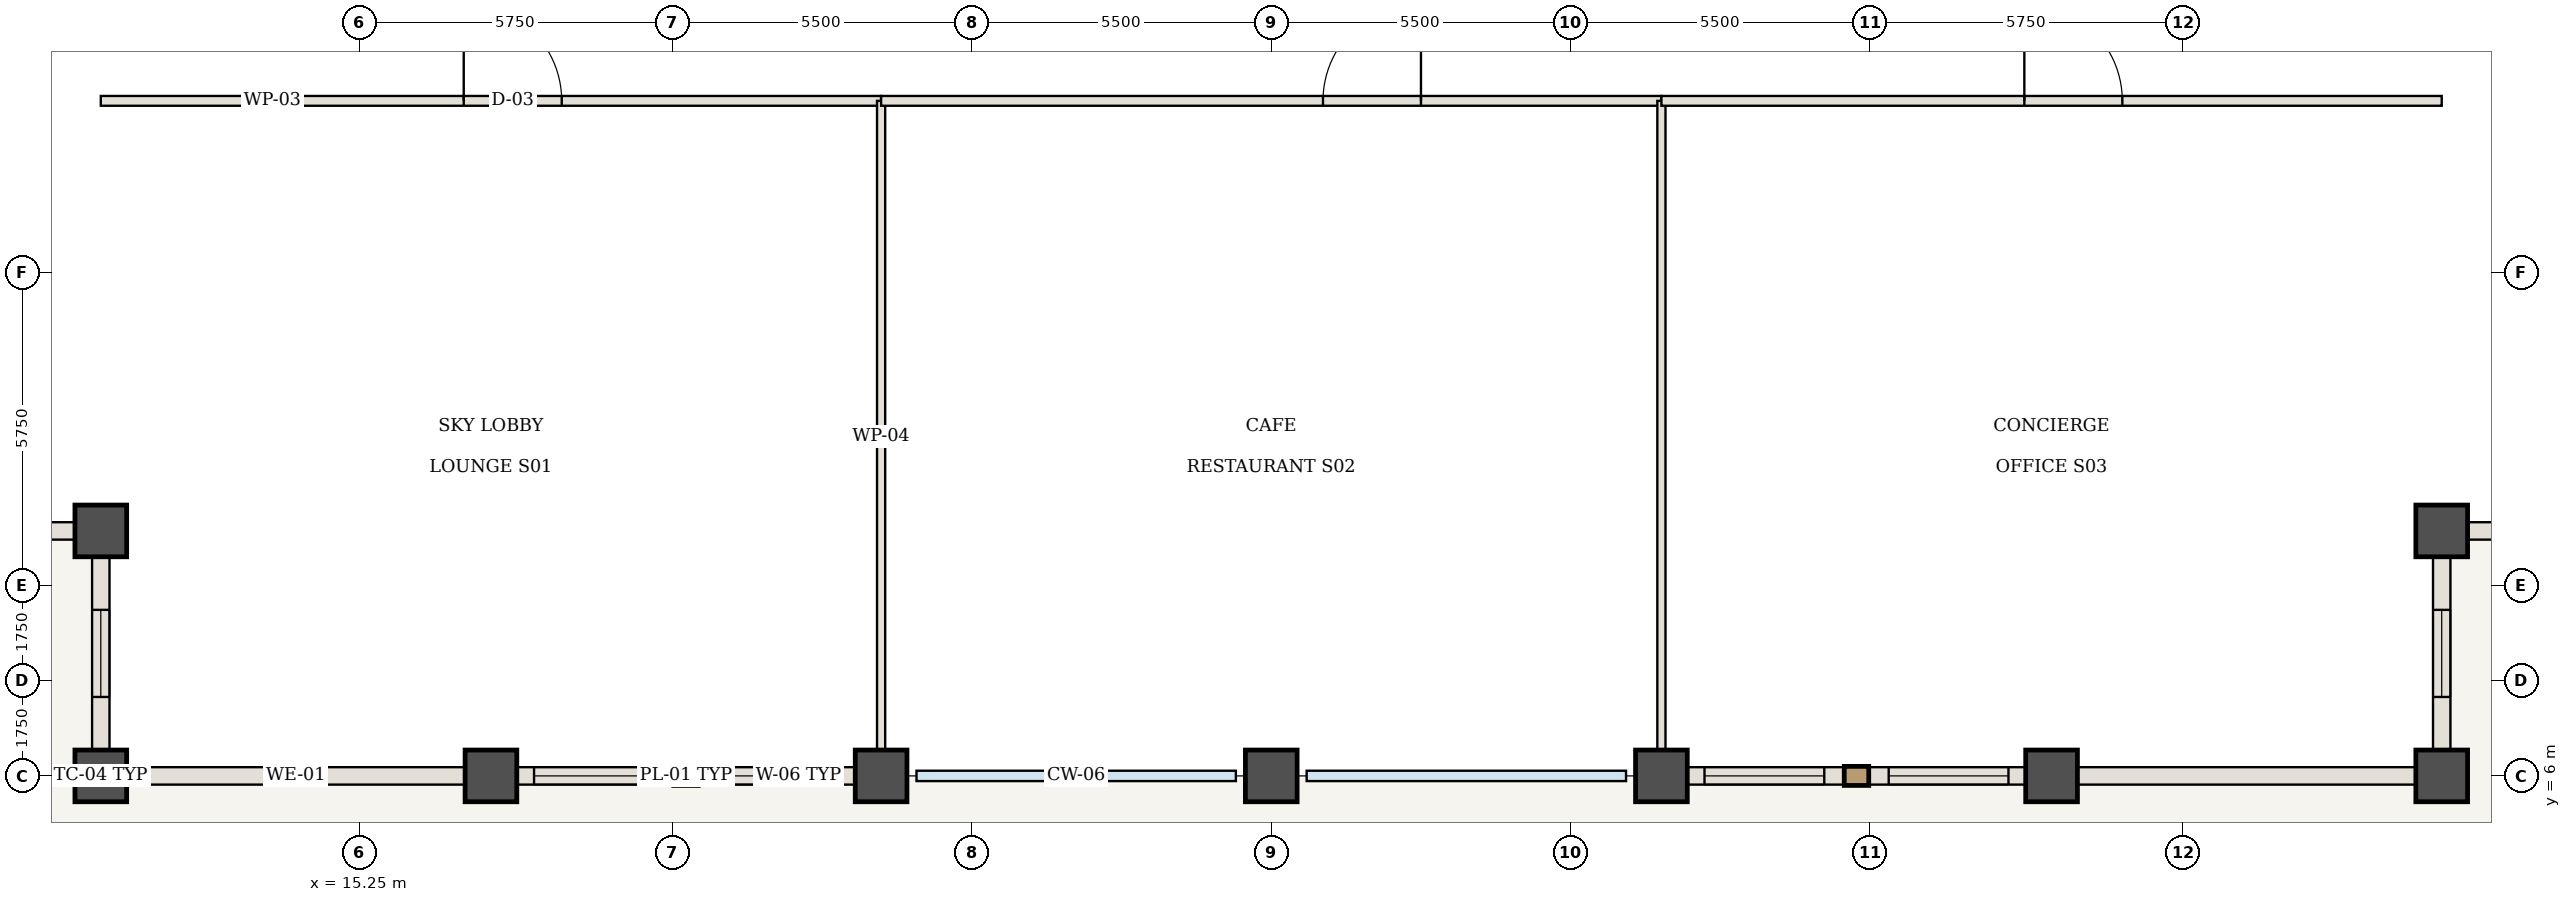
"""IFC4 building model, lengths in metres.
Left out: names, types, materials, properties, quantities, classifications, styles, units other than length and angle.
Written with IfcOpenShell. Run it as: python <this file> out.ifc"""

import sys

from ifc_helpers import new_model, si_unit, direction, frame, frame_2d, origin, origin_2d, place, context, subcontext, project, spatial, rectangle, extrude, element, fill, save


model = new_model("IFC4")
c1 = context("Model", 3, precision=1e-05, world=origin(), true_north=direction((0.0, 1.0)))
c2 = subcontext(c1, "Body", "Model", "MODEL_VIEW")
j1 = project(units=[si_unit("LENGTHUNIT", "METRE"), si_unit("PLANEANGLEUNIT", "RADIAN")], contexts=[c1])
p1 = place(None, origin())
s1 = spatial("IfcSite", under=j1, at=p1, CompositionType="ELEMENT")
p2 = place(p1, origin())
s2 = spatial("IfcBuilding", under=s1, at=p2, CompositionType="ELEMENT")
p3 = place(p2, frame((0.0, 0.0, 106.05)))
s3 = spatial("IfcBuildingStorey", under=s2, at=p3, CompositionType="ELEMENT", Elevation=106.05)
for number, where, z_axis, x_axis in (
    (1, (10.5, 6.0, -0.42), (0.0, 0.0, 1.0), (1.0, 0.0, 0.0)),
    (2, (10.5, 10.5, -0.42), (0.0, 0.0, 1.0), (1.0, 0.0, 0.0)),
    (3, (53.5, 6.0, -0.42), (0.0, 0.0, 1.0), (1.0, 0.0, 0.0)),
    (4, (53.5, 10.5, -0.42), (0.0, 0.0, 1.0), (1.0, 0.0, 0.0)),
    (5, (17.667, 6.0, -0.42), (0.0, 0.0, 1.0), (1.0, 0.0, 0.0)),
    (6, (24.833, 6.0, -0.42), (0.0, 0.0, 1.0), (1.0, 0.0, 0.0)),
    (7, (32.0, 6.0, -0.42), (0.0, 0.0, 1.0), (1.0, 0.0, 0.0)),
    (8, (39.167, 6.0, -0.42), (0.0, 0.0, 1.0), (1.0, 0.0, 0.0)),
    (9, (46.333, 6.0, -0.42), (0.0, 0.0, 1.0), (1.0, 0.0, 0.0)),
):
    element("IfcColumn", number, at=place(p3, frame(where, z_axis=z_axis, x_axis=x_axis)), inside=s3, PredefinedType="COLUMN", context=c2, shape_type="SweptSolid", body=[
        extrude(rectangle(XDim=0.95, YDim=0.95, at=origin_2d()), origin(), (0.0, 0.0, 1.0), 4.97),
    ])
p4 = place(p3, frame((10.5, 18.4, 0.0), z_axis=(0.0, 0.0, 1.0), x_axis=(1.0, 0.0, 0.0)))
e10 = element("IfcWall", 10, at=p4, inside=s3, PredefinedType="STANDARD", context=c2, shape_type="SweptSolid", body=[
    extrude(rectangle(XDim=14.333, YDim=0.18, at=frame_2d((7.167, 0.0))), origin(), (0.0, 0.0, 1.0), 4.13),
])
p5 = place(p4, frame((6.667, 0.0, 0.0)))
e11 = element("IfcOpeningElement", 11, at=p5, cuts=e10, PredefinedType="OPENING", context=c2, shape_type="SweptSolid", body=[
    extrude(rectangle(XDim=1.8, YDim=2.35, at=frame_2d((0.9, 1.175))), frame((0.0, 0.1, 0.0), z_axis=(0.0, -1.0, 0.0), x_axis=(1.0, 0.0, 0.0)), (0.0, 0.0, 1.0), 0.2),
])
p6 = place(p3, frame((24.833, 6.06, 0.0), z_axis=(0.0, 0.0, 1.0), x_axis=(0.0, 1.0, 0.0)))
e12 = element("IfcWall", 12, at=p6, inside=s3, PredefinedType="STANDARD", context=c2, shape_type="SweptSolid", body=[
    extrude(rectangle(XDim=12.34, YDim=0.15, at=frame_2d((6.17, 0.0))), origin(), (0.0, 0.0, 1.0), 4.13),
])
p7 = place(p3, frame((24.833, 18.4, 0.0), z_axis=(0.0, 0.0, 1.0), x_axis=(1.0, 0.0, 0.0)))
e13 = element("IfcWall", 13, at=p7, inside=s3, PredefinedType="STANDARD", context=c2, shape_type="SweptSolid", body=[
    extrude(rectangle(XDim=14.333, YDim=0.18, at=frame_2d((7.167, 0.0))), origin(), (0.0, 0.0, 1.0), 4.13),
])
p8 = place(p7, frame((8.117, 0.0, 0.0)))
e14 = element("IfcOpeningElement", 14, at=p8, cuts=e13, PredefinedType="OPENING", context=c2, shape_type="SweptSolid", body=[
    extrude(rectangle(XDim=1.8, YDim=2.35, at=frame_2d((0.9, 1.175))), frame((0.0, 0.1, 0.0), z_axis=(0.0, -1.0, 0.0), x_axis=(1.0, 0.0, 0.0)), (0.0, 0.0, 1.0), 0.2),
])
p9 = place(p3, frame((39.167, 6.06, 0.0), z_axis=(0.0, 0.0, 1.0), x_axis=(0.0, 1.0, 0.0)))
e15 = element("IfcWall", 15, at=p9, inside=s3, PredefinedType="STANDARD", context=c2, shape_type="SweptSolid", body=[
    extrude(rectangle(XDim=12.34, YDim=0.15, at=frame_2d((6.17, 0.0))), origin(), (0.0, 0.0, 1.0), 4.13),
])
p10 = place(p3, frame((39.167, 18.4, 0.0), z_axis=(0.0, 0.0, 1.0), x_axis=(1.0, 0.0, 0.0)))
e16 = element("IfcWall", 16, at=p10, inside=s3, PredefinedType="STANDARD", context=c2, shape_type="SweptSolid", body=[
    extrude(rectangle(XDim=14.333, YDim=0.18, at=frame_2d((7.167, 0.0))), origin(), (0.0, 0.0, 1.0), 4.13),
])
p11 = place(p10, frame((6.667, 0.0, 0.0)))
e17 = element("IfcOpeningElement", 17, at=p11, cuts=e16, PredefinedType="OPENING", context=c2, shape_type="SweptSolid", body=[
    extrude(rectangle(XDim=1.8, YDim=2.35, at=frame_2d((0.9, 1.175))), frame((0.0, 0.1, 0.0), z_axis=(0.0, -1.0, 0.0), x_axis=(1.0, 0.0, 0.0)), (0.0, 0.0, 1.0), 0.2),
])
p12 = place(p3, frame((17.667, 6.0, 0.0), z_axis=(0.0, 0.0, 1.0), x_axis=(-1.0, 0.0, 0.0)))
e18 = element("IfcWall", 18, at=p12, inside=s3, PredefinedType="USERDEFINED", context=c2, shape_type="SweptSolid", body=[
    extrude(rectangle(XDim=7.167, YDim=0.32, at=frame_2d((3.583, 0.0))), origin(), (0.0, 0.0, 1.0), 3.33),
])
p13 = place(p3, frame((24.833, 6.0, 0.0), z_axis=(0.0, 0.0, 1.0), x_axis=(-1.0, 0.0, 0.0)))
e19 = element("IfcWall", 19, at=p13, inside=s3, PredefinedType="USERDEFINED", context=c2, shape_type="SweptSolid", body=[
    extrude(rectangle(XDim=7.167, YDim=0.32, at=frame_2d((3.583, 0.0))), origin(), (0.0, 0.0, 1.0), 3.33),
])
p14 = place(p13, frame((0.792, 0.0, 0.85)))
e20 = element("IfcOpeningElement", 20, at=p14, cuts=e19, PredefinedType="OPENING", context=c2, shape_type="SweptSolid", body=[
    extrude(rectangle(XDim=2.2, YDim=2.2, at=frame_2d((1.1, 1.1))), frame((0.0, 0.17, 0.0), z_axis=(0.0, -1.0, 0.0), x_axis=(1.0, 0.0, 0.0)), (0.0, 0.0, 1.0), 0.34),
])
p15 = place(p13, frame((4.175, 0.0, 0.85)))
e21 = element("IfcOpeningElement", 21, at=p15, cuts=e19, PredefinedType="OPENING", context=c2, shape_type="SweptSolid", body=[
    extrude(rectangle(XDim=2.2, YDim=2.2, at=frame_2d((1.1, 1.1))), frame((0.0, 0.17, 0.0), z_axis=(0.0, -1.0, 0.0), x_axis=(1.0, 0.0, 0.0)), (0.0, 0.0, 1.0), 0.34),
])
p16 = place(p3, frame((46.333, 6.0, 0.0), z_axis=(0.0, 0.0, 1.0), x_axis=(-1.0, 0.0, 0.0)))
e22 = element("IfcWall", 22, at=p16, inside=s3, PredefinedType="USERDEFINED", context=c2, shape_type="SweptSolid", body=[
    extrude(rectangle(XDim=7.167, YDim=0.32, at=frame_2d((3.583, 0.0))), origin(), (0.0, 0.0, 1.0), 3.33),
])
p17 = place(p16, frame((0.792, 0.0, 0.85)))
e23 = element("IfcOpeningElement", 23, at=p17, cuts=e22, PredefinedType="OPENING", context=c2, shape_type="SweptSolid", body=[
    extrude(rectangle(XDim=2.2, YDim=2.2, at=frame_2d((1.1, 1.1))), frame((0.0, 0.17, 0.0), z_axis=(0.0, -1.0, 0.0), x_axis=(1.0, 0.0, 0.0)), (0.0, 0.0, 1.0), 0.34),
])
p18 = place(p16, frame((4.175, 0.0, 0.85)))
e24 = element("IfcOpeningElement", 24, at=p18, cuts=e22, PredefinedType="OPENING", context=c2, shape_type="SweptSolid", body=[
    extrude(rectangle(XDim=2.2, YDim=2.2, at=frame_2d((1.1, 1.1))), frame((0.0, 0.17, 0.0), z_axis=(0.0, -1.0, 0.0), x_axis=(1.0, 0.0, 0.0)), (0.0, 0.0, 1.0), 0.34),
])
p19 = place(p3, frame((53.5, 6.0, 0.0), z_axis=(0.0, 0.0, 1.0), x_axis=(-1.0, 0.0, 0.0)))
e25 = element("IfcWall", 25, at=p19, inside=s3, PredefinedType="USERDEFINED", context=c2, shape_type="SweptSolid", body=[
    extrude(rectangle(XDim=7.167, YDim=0.32, at=frame_2d((3.583, 0.0))), origin(), (0.0, 0.0, 1.0), 3.33),
])
p20 = place(p3, frame((10.5, 6.0, 0.0), z_axis=(0.0, 0.0, 1.0), x_axis=(0.0, 1.0, 0.0)))
e26 = element("IfcWall", 26, at=p20, inside=s3, PredefinedType="USERDEFINED", context=c2, shape_type="SweptSolid", body=[
    extrude(rectangle(XDim=4.5, YDim=0.32, at=frame_2d((2.25, 0.0))), origin(), (0.0, 0.0, 1.0), 3.33),
])
p21 = place(p20, frame((1.45, 0.0, 0.85)))
e27 = element("IfcOpeningElement", 27, at=p21, cuts=e26, PredefinedType="OPENING", context=c2, shape_type="SweptSolid", body=[
    extrude(rectangle(XDim=1.6, YDim=2.05, at=frame_2d((0.8, 1.025))), frame((0.0, 0.17, 0.0), z_axis=(0.0, -1.0, 0.0), x_axis=(1.0, 0.0, 0.0)), (0.0, 0.0, 1.0), 0.34),
])
p22 = place(p3, frame((10.5, 10.5, 0.0), z_axis=(0.0, 0.0, 1.0), x_axis=(-1.0, 0.0, 0.0)))
e28 = element("IfcWall", 28, at=p22, inside=s3, PredefinedType="USERDEFINED", context=c2, shape_type="SweptSolid", body=[
    extrude(rectangle(XDim=4.5, YDim=0.32, at=frame_2d((2.25, 0.0))), origin(), (0.0, 0.0, 1.0), 3.33),
])
p23 = place(p22, frame((1.45, 0.0, 0.85)))
e29 = element("IfcOpeningElement", 29, at=p23, cuts=e28, PredefinedType="OPENING", context=c2, shape_type="SweptSolid", body=[
    extrude(rectangle(XDim=1.6, YDim=2.05, at=frame_2d((0.8, 1.025))), frame((0.0, 0.17, 0.0), z_axis=(0.0, -1.0, 0.0), x_axis=(1.0, 0.0, 0.0)), (0.0, 0.0, 1.0), 0.34),
])
p24 = place(p3, frame((53.5, 10.5, 0.0), z_axis=(0.0, 0.0, 1.0), x_axis=(0.0, -1.0, 0.0)))
e30 = element("IfcWall", 30, at=p24, inside=s3, PredefinedType="USERDEFINED", context=c2, shape_type="SweptSolid", body=[
    extrude(rectangle(XDim=4.5, YDim=0.32, at=frame_2d((2.25, 0.0))), origin(), (0.0, 0.0, 1.0), 3.33),
])
p25 = place(p24, frame((1.45, 0.0, 0.85)))
e31 = element("IfcOpeningElement", 31, at=p25, cuts=e30, PredefinedType="OPENING", context=c2, shape_type="SweptSolid", body=[
    extrude(rectangle(XDim=1.6, YDim=2.05, at=frame_2d((0.8, 1.025))), frame((0.0, 0.17, 0.0), z_axis=(0.0, -1.0, 0.0), x_axis=(1.0, 0.0, 0.0)), (0.0, 0.0, 1.0), 0.34),
])
p26 = place(p3, frame((58.0, 10.5, 0.0), z_axis=(0.0, 0.0, 1.0), x_axis=(-1.0, 0.0, 0.0)))
e32 = element("IfcWall", 32, at=p26, inside=s3, PredefinedType="USERDEFINED", context=c2, shape_type="SweptSolid", body=[
    extrude(rectangle(XDim=4.5, YDim=0.32, at=frame_2d((2.25, 0.0))), origin(), (0.0, 0.0, 1.0), 3.33),
])
p27 = place(p26, frame((1.45, 0.0, 0.85)))
e33 = element("IfcOpeningElement", 33, at=p27, cuts=e32, PredefinedType="OPENING", context=c2, shape_type="SweptSolid", body=[
    extrude(rectangle(XDim=1.6, YDim=2.05, at=frame_2d((0.8, 1.025))), frame((0.0, 0.17, 0.0), z_axis=(0.0, -1.0, 0.0), x_axis=(1.0, 0.0, 0.0)), (0.0, 0.0, 1.0), 0.34),
])
p28 = place(p5, origin())
e34 = element("IfcDoor", 34, at=p28, inside=s3, OperationType="SINGLE_SWING_LEFT", PredefinedType="DOOR", context=c2, shape_type="SweptSolid", body=[
    extrude(rectangle(XDim=1.8, YDim=2.35, at=frame_2d((0.9, 1.175))), frame((0.0, 0.025, 0.0), z_axis=(0.0, -1.0, 0.0), x_axis=(1.0, 0.0, 0.0)), (0.0, 0.0, 1.0), 0.05),
])
fill(e11, e34)
p29 = place(p8, origin())
e35 = element("IfcDoor", 35, at=p29, inside=s3, OperationType="SINGLE_SWING_RIGHT", PredefinedType="DOOR", context=c2, shape_type="SweptSolid", body=[
    extrude(rectangle(XDim=1.8, YDim=2.35, at=frame_2d((0.9, 1.175))), frame((0.0, 0.025, 0.0), z_axis=(0.0, -1.0, 0.0), x_axis=(1.0, 0.0, 0.0)), (0.0, 0.0, 1.0), 0.05),
])
fill(e14, e35)
p30 = place(p11, origin())
e36 = element("IfcDoor", 36, at=p30, inside=s3, OperationType="SINGLE_SWING_LEFT", PredefinedType="DOOR", context=c2, shape_type="SweptSolid", body=[
    extrude(rectangle(XDim=1.8, YDim=2.35, at=frame_2d((0.9, 1.175))), frame((0.0, 0.025, 0.0), z_axis=(0.0, -1.0, 0.0), x_axis=(1.0, 0.0, 0.0)), (0.0, 0.0, 1.0), 0.05),
])
fill(e17, e36)
p31 = place(p14, origin())
e37 = element("IfcWindow", 37, at=p31, inside=s3, PartitioningType="SINGLE_PANEL", PredefinedType="WINDOW", context=c2, shape_type="SweptSolid", body=[
    extrude(rectangle(XDim=2.2, YDim=2.2, at=frame_2d((1.1, 1.1))), frame((0.0, 0.03, 0.0), z_axis=(0.0, -1.0, 0.0), x_axis=(1.0, 0.0, 0.0)), (0.0, 0.0, 1.0), 0.06),
])
fill(e20, e37)
p32 = place(p15, origin())
e38 = element("IfcWindow", 38, at=p32, inside=s3, PartitioningType="SINGLE_PANEL", PredefinedType="WINDOW", context=c2, shape_type="SweptSolid", body=[
    extrude(rectangle(XDim=2.2, YDim=2.2, at=frame_2d((1.1, 1.1))), frame((0.0, 0.03, 0.0), z_axis=(0.0, -1.0, 0.0), x_axis=(1.0, 0.0, 0.0)), (0.0, 0.0, 1.0), 0.06),
])
fill(e21, e38)
p33 = place(p17, origin())
e39 = element("IfcWindow", 39, at=p33, inside=s3, PartitioningType="SINGLE_PANEL", PredefinedType="WINDOW", context=c2, shape_type="SweptSolid", body=[
    extrude(rectangle(XDim=2.2, YDim=2.2, at=frame_2d((1.1, 1.1))), frame((0.0, 0.03, 0.0), z_axis=(0.0, -1.0, 0.0), x_axis=(1.0, 0.0, 0.0)), (0.0, 0.0, 1.0), 0.06),
])
fill(e23, e39)
p34 = place(p18, origin())
e40 = element("IfcWindow", 40, at=p34, inside=s3, PartitioningType="SINGLE_PANEL", PredefinedType="WINDOW", context=c2, shape_type="SweptSolid", body=[
    extrude(rectangle(XDim=2.2, YDim=2.2, at=frame_2d((1.1, 1.1))), frame((0.0, 0.03, 0.0), z_axis=(0.0, -1.0, 0.0), x_axis=(1.0, 0.0, 0.0)), (0.0, 0.0, 1.0), 0.06),
])
fill(e24, e40)
p35 = place(p21, origin())
e41 = element("IfcWindow", 41, at=p35, inside=s3, PartitioningType="SINGLE_PANEL", PredefinedType="WINDOW", context=c2, shape_type="SweptSolid", body=[
    extrude(rectangle(XDim=1.6, YDim=2.05, at=frame_2d((0.8, 1.025))), frame((0.0, 0.03, 0.0), z_axis=(0.0, -1.0, 0.0), x_axis=(1.0, 0.0, 0.0)), (0.0, 0.0, 1.0), 0.06),
])
fill(e27, e41)
p36 = place(p25, origin())
e42 = element("IfcWindow", 42, at=p36, inside=s3, PartitioningType="SINGLE_PANEL", PredefinedType="WINDOW", context=c2, shape_type="SweptSolid", body=[
    extrude(rectangle(XDim=1.6, YDim=2.05, at=frame_2d((0.8, 1.025))), frame((0.0, 0.03, 0.0), z_axis=(0.0, -1.0, 0.0), x_axis=(1.0, 0.0, 0.0)), (0.0, 0.0, 1.0), 0.06),
])
fill(e31, e42)
save(model, sys.argv[1])
